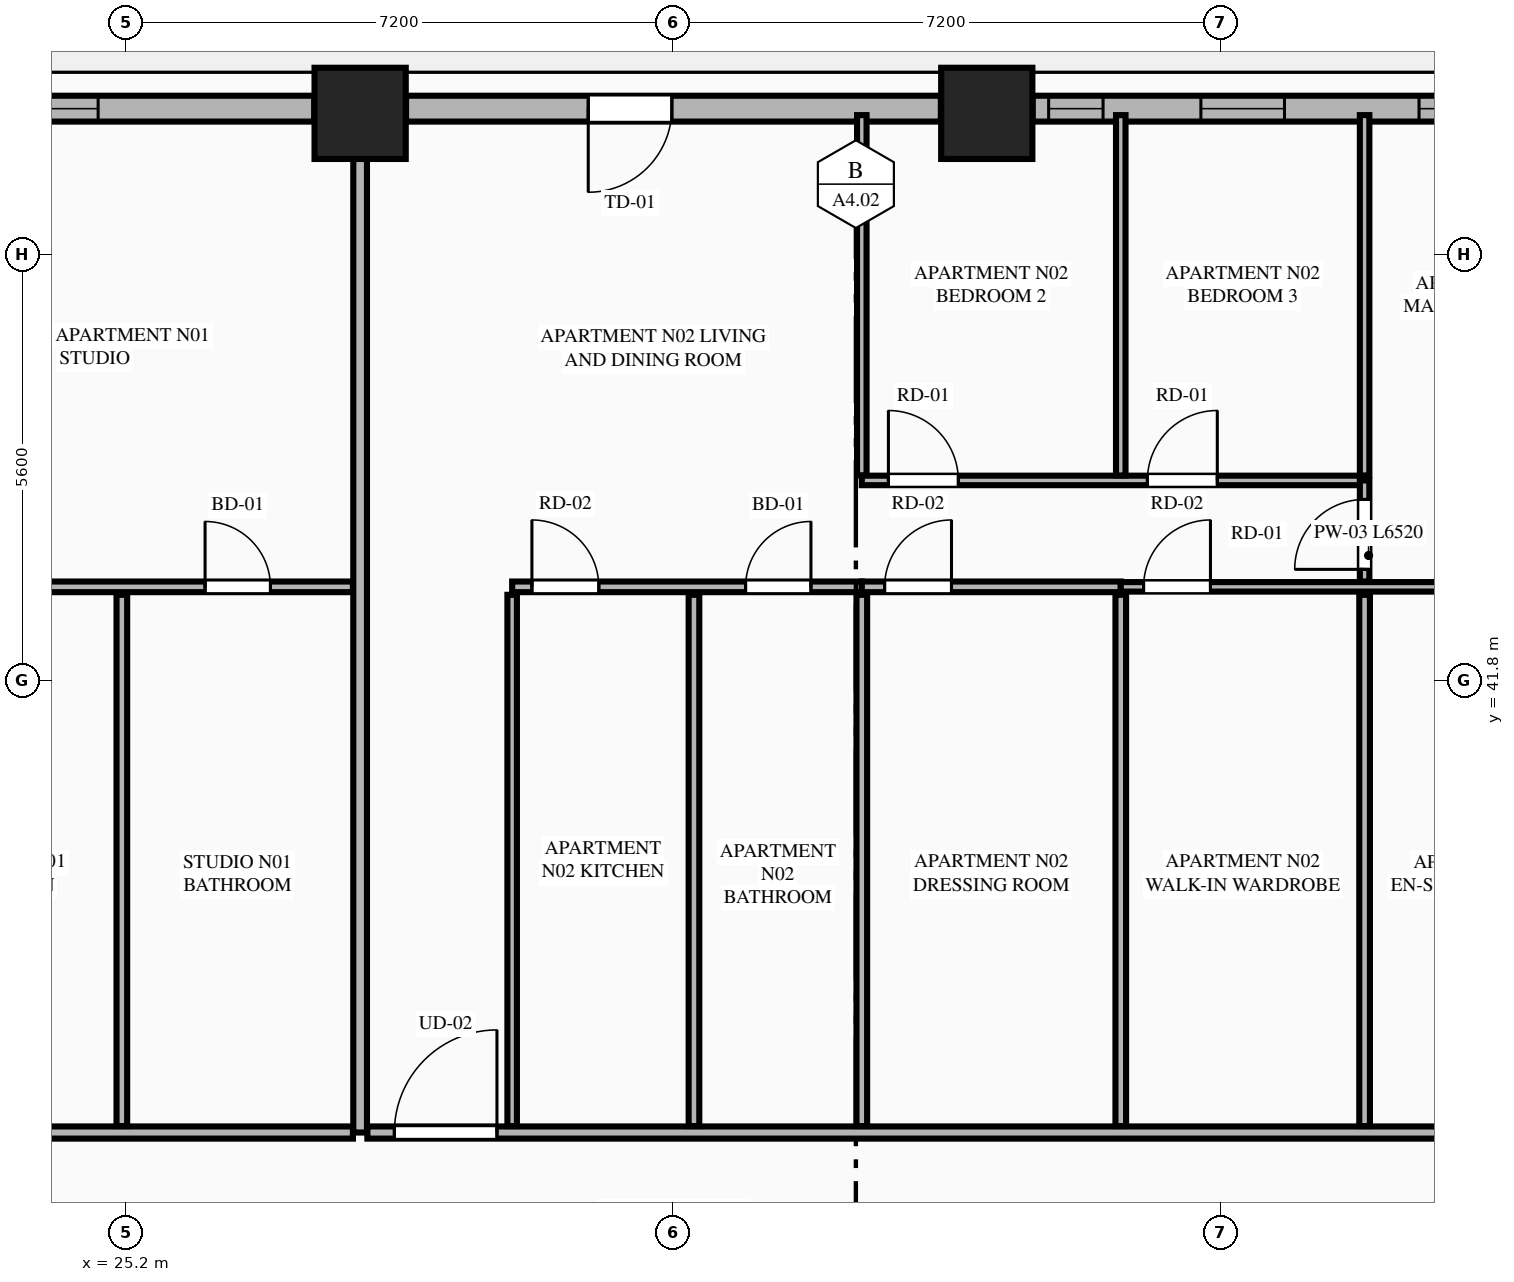
"""IFC4 building model, lengths in metres.
Left out: names, types, materials, properties, quantities, classifications, styles, units other than length and angle.
Written with IfcOpenShell. Run it as: python <this file> out.ifc"""

import sys

from ifc_helpers import new_model, si_unit, direction, frame, frame_2d, origin, origin_2d, place, context, subcontext, project, spatial, rectangle, extrude, element, fill, save


model = new_model("IFC4")
c1 = context("Model", 3, precision=1e-05, world=origin(), true_north=direction((0.0, 1.0)))
c2 = subcontext(c1, "Body", "Model", "MODEL_VIEW")
j1 = project(units=[si_unit("LENGTHUNIT", "METRE"), si_unit("PLANEANGLEUNIT", "RADIAN")], contexts=[c1])
p1 = place(None, origin())
s1 = spatial("IfcSite", under=j1, at=p1, CompositionType="ELEMENT")
p2 = place(p1, origin())
s2 = spatial("IfcBuilding", under=s1, at=p2, CompositionType="ELEMENT")
p3 = place(p2, frame((0.0, 0.0, 63.95)))
s3 = spatial("IfcBuildingStorey", under=s2, at=p3, CompositionType="ELEMENT", Elevation=63.95)
for number, where, z_axis, x_axis in (
    (1, (36.522, 49.258, 0.0), (0.0, 0.0, 1.0), (1.0, 0.0, 0.0)),
    (2, (28.278, 49.258, 0.0), (0.0, 0.0, 1.0), (1.0, 0.0, 0.0)),
):
    element("IfcColumn", number, at=place(p3, frame(where, z_axis=z_axis, x_axis=x_axis)), inside=s3, PredefinedType="COLUMN", context=c2, shape_type="SweptSolid", body=[
        extrude(rectangle(XDim=1.2, YDim=1.2, at=origin_2d()), origin(), (0.0, 0.0, 1.0), 3.55),
    ])
p4 = place(p3, frame((43.913, 49.32, 0.0), z_axis=(0.0, 0.0, 1.0), x_axis=(-1.0, 0.0, 0.0)))
e3 = element("IfcWall", 3, at=p4, inside=s3, PredefinedType="STANDARD", context=c2, shape_type="SweptSolid", body=[
    extrude(rectangle(XDim=6.787, YDim=0.34, at=frame_2d((3.394, 0.0))), origin(), (0.0, 0.0, 1.0), 2.787),
])
p5 = place(p4, frame((0.604, 0.0, 0.75)))
e4 = element("IfcOpeningElement", 4, at=p5, cuts=e3, PredefinedType="OPENING", context=c2, shape_type="SweptSolid", body=[
    extrude(rectangle(XDim=1.1, YDim=1.887, at=frame_2d((0.55, 0.943))), frame((0.0, 0.18, 0.0), z_axis=(0.0, -1.0, 0.0), x_axis=(1.0, 0.0, 0.0)), (0.0, 0.0, 1.0), 0.36),
])
p6 = place(p4, frame((3.474, 0.0, 0.75)))
e5 = element("IfcOpeningElement", 5, at=p6, cuts=e3, PredefinedType="OPENING", context=c2, shape_type="SweptSolid", body=[
    extrude(rectangle(XDim=1.1, YDim=1.887, at=frame_2d((0.55, 0.943))), frame((0.0, 0.18, 0.0), z_axis=(0.0, -1.0, 0.0), x_axis=(1.0, 0.0, 0.0)), (0.0, 0.0, 1.0), 0.36),
])
p7 = place(p4, frame((5.861, 0.0, 0.75)))
e6 = element("IfcOpeningElement", 6, at=p7, cuts=e3, PredefinedType="OPENING", context=c2, shape_type="SweptSolid", body=[
    extrude(rectangle(XDim=0.716, YDim=1.887, at=frame_2d((0.358, 0.943))), frame((0.0, 0.18, 0.0), z_axis=(0.0, -1.0, 0.0), x_axis=(1.0, 0.0, 0.0)), (0.0, 0.0, 1.0), 0.36),
])
p8 = place(p3, frame((35.918, 49.32, 0.0), z_axis=(0.0, 0.0, 1.0), x_axis=(-1.0, 0.0, 0.0)))
e7 = element("IfcWall", 7, at=p8, inside=s3, PredefinedType="STANDARD", context=c2, shape_type="SweptSolid", body=[
    extrude(rectangle(XDim=7.036, YDim=0.34, at=frame_2d((3.518, 0.0))), origin(), (0.0, 0.0, 1.0), 2.787),
])
p9 = place(p8, frame((3.539, 0.0, 0.0)))
e8 = element("IfcOpeningElement", 8, at=p9, cuts=e7, PredefinedType="OPENING", context=c2, shape_type="SweptSolid", body=[
    extrude(rectangle(XDim=1.1, YDim=2.25, at=frame_2d((0.55, 1.125))), frame((0.0, 0.18, 0.0), z_axis=(0.0, -1.0, 0.0), x_axis=(1.0, 0.0, 0.0)), (0.0, 0.0, 1.0), 0.36),
])
p10 = place(p3, frame((27.674, 49.32, 0.0), z_axis=(0.0, 0.0, 1.0), x_axis=(-1.0, 0.0, 0.0)))
e9 = element("IfcWall", 9, at=p10, inside=s3, PredefinedType="STANDARD", context=c2, shape_type="SweptSolid", body=[
    extrude(rectangle(XDim=6.787, YDim=0.34, at=frame_2d((3.394, 0.0))), origin(), (0.0, 0.0, 1.0), 2.787),
])
p11 = place(p10, frame((2.843, 0.0, 0.75)))
e10 = element("IfcOpeningElement", 10, at=p11, cuts=e9, PredefinedType="OPENING", context=c2, shape_type="SweptSolid", body=[
    extrude(rectangle(XDim=1.1, YDim=1.887, at=frame_2d((0.55, 0.943))), frame((0.0, 0.18, 0.0), z_axis=(0.0, -1.0, 0.0), x_axis=(1.0, 0.0, 0.0)), (0.0, 0.0, 1.0), 0.36),
])
p12 = place(p3, frame((28.278, 35.85, 0.0), z_axis=(0.0, 0.0, 1.0), x_axis=(0.0, 1.0, 0.0)))
e11 = element("IfcWall", 11, at=p12, inside=s3, PredefinedType="PARTITIONING", context=c2, shape_type="SweptSolid", body=[
    extrude(rectangle(XDim=13.295, YDim=0.18, at=frame_2d((6.647, 0.0))), origin(), (0.0, 0.0, 1.0), 2.7),
])
p13 = place(p3, frame((19.995, 35.85, 0.0), z_axis=(0.0, 0.0, 1.0), x_axis=(1.0, 0.0, 0.0)))
e12 = element("IfcWall", 12, at=p13, inside=s3, PredefinedType="PARTITIONING", context=c2, shape_type="SweptSolid", body=[
    extrude(rectangle(XDim=8.188, YDim=0.16, at=frame_2d((4.094, 0.0))), origin(), (0.0, 0.0, 1.0), 3.33),
])
p14 = place(p13, frame((0.705, 0.0, 0.0)))
e13 = element("IfcOpeningElement", 13, at=p14, cuts=e12, PredefinedType="OPENING", context=c2, shape_type="SweptSolid", body=[
    extrude(rectangle(XDim=1.02, YDim=2.25, at=frame_2d((0.51, 1.125))), frame((0.0, 0.09, 0.0), z_axis=(0.0, -1.0, 0.0), x_axis=(1.0, 0.0, 0.0)), (0.0, 0.0, 1.0), 0.18),
])
p15 = place(p3, frame((22.25, 43.029, 0.0), z_axis=(0.0, 0.0, 1.0), x_axis=(1.0, 0.0, 0.0)))
e14 = element("IfcWall", 14, at=p15, inside=s3, PredefinedType="PLUMBINGWALL", context=c2, shape_type="SweptSolid", body=[
    extrude(rectangle(XDim=5.933, YDim=0.14, at=frame_2d((2.967, 0.0))), origin(), (0.0, 0.0, 1.0), 3.33),
])
p16 = place(p15, frame((3.988, 0.0, 0.0)))
e15 = element("IfcOpeningElement", 15, at=p16, cuts=e14, PredefinedType="OPENING", context=c2, shape_type="SweptSolid", body=[
    extrude(rectangle(XDim=0.86, YDim=2.1, at=frame_2d((0.43, 1.05))), frame((0.0, 0.08, 0.0), z_axis=(0.0, -1.0, 0.0), x_axis=(1.0, 0.0, 0.0)), (0.0, 0.0, 1.0), 0.16),
])
p17 = place(p15, frame((0.22, 0.0, 0.0)))
e16 = element("IfcOpeningElement", 16, at=p17, cuts=e14, PredefinedType="OPENING", context=c2, shape_type="SweptSolid", body=[
    extrude(rectangle(XDim=0.88, YDim=2.15, at=frame_2d((0.44, 1.075))), frame((0.0, 0.08, 0.0), z_axis=(0.0, -1.0, 0.0), x_axis=(1.0, 0.0, 0.0)), (0.0, 0.0, 1.0), 0.16),
])
p18 = place(p3, frame((25.143, 35.935, 0.0), z_axis=(0.0, 0.0, 1.0), x_axis=(0.0, 1.0, 0.0)))
e17 = element("IfcWall", 17, at=p18, inside=s3, PredefinedType="PLUMBINGWALL", context=c2, shape_type="SweptSolid", body=[
    extrude(rectangle(XDim=6.989, YDim=0.14, at=frame_2d((3.495, 0.0))), origin(), (0.0, 0.0, 1.0), 3.33),
])
p19 = place(p3, frame((28.373, 35.85, 0.0), z_axis=(0.0, 0.0, 1.0), x_axis=(1.0, 0.0, 0.0)))
e18 = element("IfcWall", 18, at=p19, inside=s3, PredefinedType="PARTITIONING", context=c2, shape_type="SweptSolid", body=[
    extrude(rectangle(XDim=16.432, YDim=0.16, at=frame_2d((8.216, 0.0))), origin(), (0.0, 0.0, 1.0), 3.33),
])
p20 = place(p19, frame((0.355, 0.0, 0.0)))
e19 = element("IfcOpeningElement", 19, at=p20, cuts=e18, PredefinedType="OPENING", context=c2, shape_type="SweptSolid", body=[
    extrude(rectangle(XDim=1.35, YDim=2.35, at=frame_2d((0.675, 1.175))), frame((0.0, 0.09, 0.0), z_axis=(0.0, -1.0, 0.0), x_axis=(1.0, 0.0, 0.0)), (0.0, 0.0, 1.0), 0.18),
])
p21 = place(p3, frame((30.278, 35.935, 0.0), z_axis=(0.0, 0.0, 1.0), x_axis=(0.0, 1.0, 0.0)))
e20 = element("IfcWall", 20, at=p21, inside=s3, PredefinedType="PARTITIONING", context=c2, shape_type="SweptSolid", body=[
    extrude(rectangle(XDim=6.989, YDim=0.125, at=frame_2d((3.495, 0.0))), origin(), (0.0, 0.0, 1.0), 3.33),
])
p22 = place(p3, frame((30.278, 43.029, 0.0), z_axis=(0.0, 0.0, 1.0), x_axis=(1.0, 0.0, 0.0)))
e21 = element("IfcWall", 21, at=p22, inside=s3, PredefinedType="PLUMBINGWALL", context=c2, shape_type="SweptSolid", body=[
    extrude(rectangle(XDim=4.6, YDim=0.14, at=frame_2d((2.3, 0.0))), origin(), (0.0, 0.0, 1.0), 3.33),
])
p23 = place(p22, frame((3.071, 0.0, 0.0)))
e22 = element("IfcOpeningElement", 22, at=p23, cuts=e21, PredefinedType="OPENING", context=c2, shape_type="SweptSolid", body=[
    extrude(rectangle(XDim=0.86, YDim=2.1, at=frame_2d((0.43, 1.05))), frame((0.0, 0.08, 0.0), z_axis=(0.0, -1.0, 0.0), x_axis=(1.0, 0.0, 0.0)), (0.0, 0.0, 1.0), 0.16),
])
p24 = place(p22, frame((0.26, 0.0, 0.0)))
e23 = element("IfcOpeningElement", 23, at=p24, cuts=e21, PredefinedType="OPENING", context=c2, shape_type="SweptSolid", body=[
    extrude(rectangle(XDim=0.88, YDim=2.15, at=frame_2d((0.44, 1.075))), frame((0.0, 0.08, 0.0), z_axis=(0.0, -1.0, 0.0), x_axis=(1.0, 0.0, 0.0)), (0.0, 0.0, 1.0), 0.16),
])
p25 = place(p3, frame((34.878, 43.029, 0.0), z_axis=(0.0, 0.0, 1.0), x_axis=(1.0, 0.0, 0.0)))
e24 = element("IfcWall", 24, at=p25, inside=s3, PredefinedType="PLUMBINGWALL", context=c2, shape_type="SweptSolid", body=[
    extrude(rectangle(XDim=3.407, YDim=0.14, at=frame_2d((1.704, 0.0))), origin(), (0.0, 0.0, 1.0), 3.33),
])
p26 = place(p25, frame((0.3, 0.0, 0.0)))
e25 = element("IfcOpeningElement", 25, at=p26, cuts=e24, PredefinedType="OPENING", context=c2, shape_type="SweptSolid", body=[
    extrude(rectangle(XDim=0.88, YDim=2.15, at=frame_2d((0.44, 1.075))), frame((0.0, 0.08, 0.0), z_axis=(0.0, -1.0, 0.0), x_axis=(1.0, 0.0, 0.0)), (0.0, 0.0, 1.0), 0.16),
])
p27 = place(p3, frame((38.285, 43.029, 0.0), z_axis=(0.0, 0.0, 1.0), x_axis=(1.0, 0.0, 0.0)))
e26 = element("IfcWall", 26, at=p27, inside=s3, PredefinedType="PARTITIONING", context=c2, shape_type="SweptSolid", body=[
    extrude(rectangle(XDim=6.52, YDim=0.125, at=frame_2d((3.26, 0.0))), origin(), (0.0, 0.0, 1.0), 3.33),
])
p28 = place(p27, frame((4.439, 0.0, 0.0)))
e27 = element("IfcOpeningElement", 27, at=p28, cuts=e26, PredefinedType="OPENING", context=c2, shape_type="SweptSolid", body=[
    extrude(rectangle(XDim=0.86, YDim=2.1, at=frame_2d((0.43, 1.05))), frame((0.0, 0.073, 0.0), z_axis=(0.0, -1.0, 0.0), x_axis=(1.0, 0.0, 0.0)), (0.0, 0.0, 1.0), 0.145),
])
p29 = place(p27, frame((0.3, 0.0, 0.0)))
e28 = element("IfcOpeningElement", 28, at=p29, cuts=e26, PredefinedType="OPENING", context=c2, shape_type="SweptSolid", body=[
    extrude(rectangle(XDim=0.88, YDim=2.15, at=frame_2d((0.44, 1.075))), frame((0.0, 0.073, 0.0), z_axis=(0.0, -1.0, 0.0), x_axis=(1.0, 0.0, 0.0)), (0.0, 0.0, 1.0), 0.145),
])
p30 = place(p3, frame((32.67, 35.935, 0.0), z_axis=(0.0, 0.0, 1.0), x_axis=(0.0, 1.0, 0.0)))
e29 = element("IfcWall", 29, at=p30, inside=s3, PredefinedType="PLUMBINGWALL", context=c2, shape_type="SweptSolid", body=[
    extrude(rectangle(XDim=6.989, YDim=0.14, at=frame_2d((3.495, 0.0))), origin(), (0.0, 0.0, 1.0), 3.33),
])
p31 = place(p3, frame((34.878, 44.494, 0.0), z_axis=(0.0, 0.0, 1.0), x_axis=(0.0, 1.0, 0.0)))
e30 = element("IfcWall", 30, at=p31, inside=s3, PredefinedType="PARTITIONING", context=c2, shape_type="SweptSolid", body=[
    extrude(rectangle(XDim=4.741, YDim=0.125, at=frame_2d((2.371, 0.0))), origin(), (0.0, 0.0, 1.0), 3.33),
])
p32 = place(p3, frame((34.878, 44.429, 0.0), z_axis=(0.0, 0.0, 1.0), x_axis=(1.0, 0.0, 0.0)))
e31 = element("IfcWall", 31, at=p32, inside=s3, PredefinedType="PARTITIONING", context=c2, shape_type="SweptSolid", body=[
    extrude(rectangle(XDim=6.615, YDim=0.125, at=frame_2d((3.308, 0.0))), origin(), (0.0, 0.0, 1.0), 3.33),
])
p33 = place(p32, frame((0.35, 0.0, 0.0)))
e32 = element("IfcOpeningElement", 32, at=p33, cuts=e31, PredefinedType="OPENING", context=c2, shape_type="SweptSolid", body=[
    extrude(rectangle(XDim=0.92, YDim=2.15, at=frame_2d((0.46, 1.075))), frame((0.0, 0.073, 0.0), z_axis=(0.0, -1.0, 0.0), x_axis=(1.0, 0.0, 0.0)), (0.0, 0.0, 1.0), 0.145),
])
p34 = place(p32, frame((3.757, 0.0, 0.0)))
e33 = element("IfcOpeningElement", 33, at=p34, cuts=e31, PredefinedType="OPENING", context=c2, shape_type="SweptSolid", body=[
    extrude(rectangle(XDim=0.92, YDim=2.15, at=frame_2d((0.46, 1.075))), frame((0.0, 0.073, 0.0), z_axis=(0.0, -1.0, 0.0), x_axis=(1.0, 0.0, 0.0)), (0.0, 0.0, 1.0), 0.145),
])
p35 = place(p3, frame((41.493, 43.099, 0.0), z_axis=(0.0, 0.0, 1.0), x_axis=(0.0, 1.0, 0.0)))
e34 = element("IfcWall", 34, at=p35, inside=s3, PredefinedType="PARTITIONING", context=c2, shape_type="SweptSolid", body=[
    extrude(rectangle(XDim=1.33, YDim=0.125, at=frame_2d((0.665, 0.0))), origin(), (0.0, 0.0, 1.0), 3.33),
])
p36 = place(p35, frame((0.16, 0.0, 0.0)))
e35 = element("IfcOpeningElement", 35, at=p36, cuts=e34, PredefinedType="OPENING", context=c2, shape_type="SweptSolid", body=[
    extrude(rectangle(XDim=0.92, YDim=2.15, at=frame_2d((0.46, 1.075))), frame((0.0, 0.073, 0.0), z_axis=(0.0, -1.0, 0.0), x_axis=(1.0, 0.0, 0.0)), (0.0, 0.0, 1.0), 0.145),
])
for number, where, z_axis, x_axis in (
    (36, (34.878, 35.935, 0.0), (0.0, 0.0, 1.0), (0.0, 1.0, 0.0)),
    (37, (38.285, 35.935, 0.0), (0.0, 0.0, 1.0), (0.0, 1.0, 0.0)),
):
    element("IfcWall", number, at=place(p3, frame(where, z_axis=z_axis, x_axis=x_axis)), inside=s3, PredefinedType="PLUMBINGWALL", context=c2, shape_type="SweptSolid", body=[
        extrude(rectangle(XDim=6.989, YDim=0.14, at=frame_2d((3.495, 0.0))), origin(), (0.0, 0.0, 1.0), 3.33),
    ])
for number, where, z_axis, x_axis in (
    (38, (38.285, 44.494, 0.0), (0.0, 0.0, 1.0), (0.0, 1.0, 0.0)),
    (39, (41.493, 44.494, 0.0), (0.0, 0.0, 1.0), (0.0, 1.0, 0.0)),
):
    element("IfcWall", number, at=place(p3, frame(where, z_axis=z_axis, x_axis=x_axis)), inside=s3, PredefinedType="PARTITIONING", context=c2, shape_type="SweptSolid", body=[
        extrude(rectangle(XDim=4.741, YDim=0.125, at=frame_2d((2.371, 0.0))), origin(), (0.0, 0.0, 1.0), 3.33),
    ])
p37 = place(p3, frame((41.493, 35.935, 0.0), z_axis=(0.0, 0.0, 1.0), x_axis=(0.0, 1.0, 0.0)))
e40 = element("IfcWall", 40, at=p37, inside=s3, PredefinedType="PLUMBINGWALL", context=c2, shape_type="SweptSolid", body=[
    extrude(rectangle(XDim=6.989, YDim=0.14, at=frame_2d((3.495, 0.0))), origin(), (0.0, 0.0, 1.0), 3.33),
])
p38 = place(p5, origin())
e41 = element("IfcWindow", 41, at=p38, inside=s3, PartitioningType="SINGLE_PANEL", PredefinedType="WINDOW", context=c2, shape_type="SweptSolid", body=[
    extrude(rectangle(XDim=1.1, YDim=1.887, at=frame_2d((0.55, 0.943))), frame((0.0, 0.03, 0.0), z_axis=(0.0, -1.0, 0.0), x_axis=(1.0, 0.0, 0.0)), (0.0, 0.0, 1.0), 0.06),
])
fill(e4, e41)
p39 = place(p9, origin())
e42 = element("IfcDoor", 42, at=p39, inside=s3, OperationType="SINGLE_SWING_RIGHT", PredefinedType="DOOR", context=c2, shape_type="SweptSolid", body=[
    extrude(rectangle(XDim=1.1, YDim=2.25, at=frame_2d((0.55, 1.125))), frame((0.0, 0.025, 0.0), z_axis=(0.0, -1.0, 0.0), x_axis=(1.0, 0.0, 0.0)), (0.0, 0.0, 1.0), 0.05),
])
fill(e8, e42)
p40 = place(p11, origin())
e43 = element("IfcWindow", 43, at=p40, inside=s3, PartitioningType="SINGLE_PANEL", PredefinedType="WINDOW", context=c2, shape_type="SweptSolid", body=[
    extrude(rectangle(XDim=1.1, YDim=1.887, at=frame_2d((0.55, 0.943))), frame((0.0, 0.03, 0.0), z_axis=(0.0, -1.0, 0.0), x_axis=(1.0, 0.0, 0.0)), (0.0, 0.0, 1.0), 0.06),
])
fill(e10, e43)
p41 = place(p16, origin())
e44 = element("IfcDoor", 44, at=p41, inside=s3, OperationType="SINGLE_SWING_LEFT", PredefinedType="DOOR", context=c2, shape_type="SweptSolid", body=[
    extrude(rectangle(XDim=0.86, YDim=2.1, at=frame_2d((0.43, 1.05))), frame((0.0, 0.025, 0.0), z_axis=(0.0, -1.0, 0.0), x_axis=(1.0, 0.0, 0.0)), (0.0, 0.0, 1.0), 0.05),
])
fill(e15, e44)
p42 = place(p23, origin())
e45 = element("IfcDoor", 45, at=p42, inside=s3, OperationType="SINGLE_SWING_RIGHT", PredefinedType="DOOR", context=c2, shape_type="SweptSolid", body=[
    extrude(rectangle(XDim=0.86, YDim=2.1, at=frame_2d((0.43, 1.05))), frame((0.0, 0.025, 0.0), z_axis=(0.0, -1.0, 0.0), x_axis=(1.0, 0.0, 0.0)), (0.0, 0.0, 1.0), 0.05),
])
fill(e22, e45)
p43 = place(p20, origin())
e46 = element("IfcDoor", 46, at=p43, inside=s3, OperationType="SINGLE_SWING_RIGHT", PredefinedType="DOOR", context=c2, shape_type="SweptSolid", body=[
    extrude(rectangle(XDim=1.35, YDim=2.35, at=frame_2d((0.675, 1.175))), frame((0.0, 0.025, 0.0), z_axis=(0.0, -1.0, 0.0), x_axis=(1.0, 0.0, 0.0)), (0.0, 0.0, 1.0), 0.05),
])
fill(e19, e46)
p44 = place(p24, origin())
e47 = element("IfcDoor", 47, at=p44, inside=s3, OperationType="SINGLE_SWING_LEFT", PredefinedType="DOOR", context=c2, shape_type="SweptSolid", body=[
    extrude(rectangle(XDim=0.88, YDim=2.15, at=frame_2d((0.44, 1.075))), frame((0.0, 0.025, 0.0), z_axis=(0.0, -1.0, 0.0), x_axis=(1.0, 0.0, 0.0)), (0.0, 0.0, 1.0), 0.05),
])
fill(e23, e47)
p45 = place(p26, origin())
e48 = element("IfcDoor", 48, at=p45, inside=s3, OperationType="SINGLE_SWING_RIGHT", PredefinedType="DOOR", context=c2, shape_type="SweptSolid", body=[
    extrude(rectangle(XDim=0.88, YDim=2.15, at=frame_2d((0.44, 1.075))), frame((0.0, 0.025, 0.0), z_axis=(0.0, -1.0, 0.0), x_axis=(1.0, 0.0, 0.0)), (0.0, 0.0, 1.0), 0.05),
])
fill(e25, e48)
p46 = place(p33, origin())
e49 = element("IfcDoor", 49, at=p46, inside=s3, OperationType="SINGLE_SWING_LEFT", PredefinedType="DOOR", context=c2, shape_type="SweptSolid", body=[
    extrude(rectangle(XDim=0.92, YDim=2.15, at=frame_2d((0.46, 1.075))), frame((0.0, 0.025, 0.0), z_axis=(0.0, -1.0, 0.0), x_axis=(1.0, 0.0, 0.0)), (0.0, 0.0, 1.0), 0.05),
])
fill(e32, e49)
p47 = place(p34, origin())
e50 = element("IfcDoor", 50, at=p47, inside=s3, OperationType="SINGLE_SWING_RIGHT", PredefinedType="DOOR", context=c2, shape_type="SweptSolid", body=[
    extrude(rectangle(XDim=0.92, YDim=2.15, at=frame_2d((0.46, 1.075))), frame((0.0, 0.025, 0.0), z_axis=(0.0, -1.0, 0.0), x_axis=(1.0, 0.0, 0.0)), (0.0, 0.0, 1.0), 0.05),
])
fill(e33, e50)
p48 = place(p36, origin())
e51 = element("IfcDoor", 51, at=p48, inside=s3, OperationType="SINGLE_SWING_LEFT", PredefinedType="DOOR", context=c2, shape_type="SweptSolid", body=[
    extrude(rectangle(XDim=0.92, YDim=2.15, at=frame_2d((0.46, 1.075))), frame((0.0, 0.025, 0.0), z_axis=(0.0, -1.0, 0.0), x_axis=(1.0, 0.0, 0.0)), (0.0, 0.0, 1.0), 0.05),
])
fill(e35, e51)
p49 = place(p29, origin())
e52 = element("IfcDoor", 52, at=p49, inside=s3, OperationType="SINGLE_SWING_RIGHT", PredefinedType="DOOR", context=c2, shape_type="SweptSolid", body=[
    extrude(rectangle(XDim=0.88, YDim=2.15, at=frame_2d((0.44, 1.075))), frame((0.0, 0.025, 0.0), z_axis=(0.0, -1.0, 0.0), x_axis=(1.0, 0.0, 0.0)), (0.0, 0.0, 1.0), 0.05),
])
fill(e28, e52)
p50 = place(p6, origin())
e53 = element("IfcWindow", 53, at=p50, inside=s3, PartitioningType="SINGLE_PANEL", PredefinedType="WINDOW", context=c2, shape_type="SweptSolid", body=[
    extrude(rectangle(XDim=1.1, YDim=1.887, at=frame_2d((0.55, 0.943))), frame((0.0, 0.03, 0.0), z_axis=(0.0, -1.0, 0.0), x_axis=(1.0, 0.0, 0.0)), (0.0, 0.0, 1.0), 0.06),
])
fill(e5, e53)
p51 = place(p7, origin())
e54 = element("IfcWindow", 54, at=p51, inside=s3, PartitioningType="SINGLE_PANEL", PredefinedType="WINDOW", context=c2, shape_type="SweptSolid", body=[
    extrude(rectangle(XDim=0.716, YDim=1.887, at=frame_2d((0.358, 0.943))), frame((0.0, 0.03, 0.0), z_axis=(0.0, -1.0, 0.0), x_axis=(1.0, 0.0, 0.0)), (0.0, 0.0, 1.0), 0.06),
])
fill(e6, e54)
save(model, sys.argv[1])
